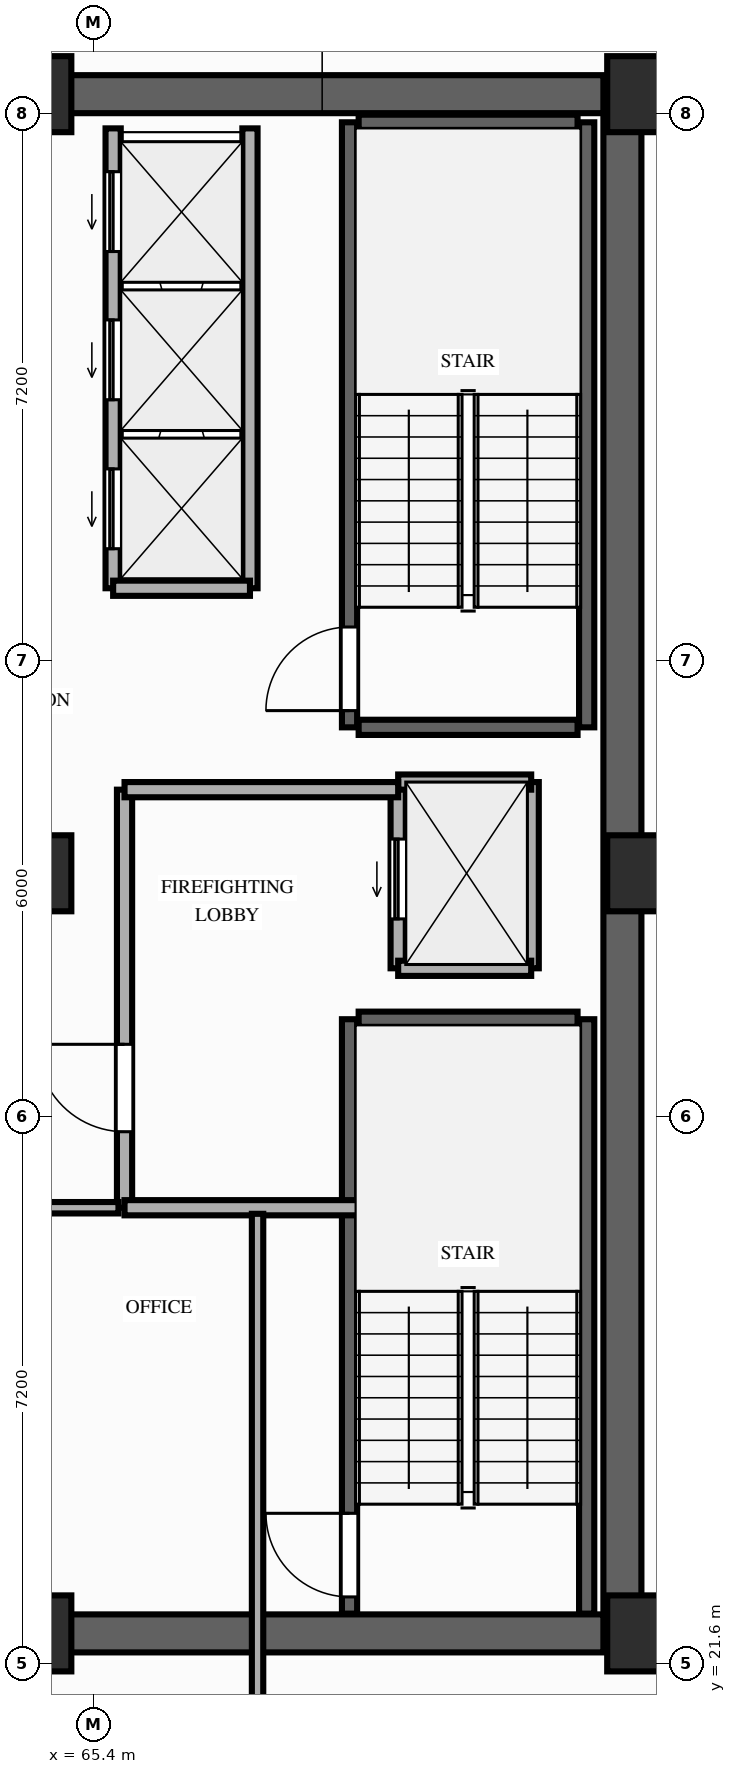
"""IFC4 building model, lengths in metres.
Left out: names, types, materials, properties, quantities, classifications, styles, units other than length and angle.
Written with IfcOpenShell. Run it as: python <this file> out.ifc"""

import sys

from ifc_helpers import new_model, si_unit, direction, frame, frame_2d, origin, origin_2d, place, context, subcontext, project, spatial, rectangle, extrude, element, fill, save


model = new_model("IFC4")
c1 = context("Model", 3, precision=1e-05, world=origin(), true_north=direction((0.0, 1.0)))
c2 = subcontext(c1, "Body", "Model", "MODEL_VIEW")
j1 = project(units=[si_unit("LENGTHUNIT", "METRE"), si_unit("PLANEANGLEUNIT", "RADIAN")], contexts=[c1])
p1 = place(None, origin())
s1 = spatial("IfcSite", under=j1, at=p1, CompositionType="ELEMENT")
p2 = place(p1, origin())
s2 = spatial("IfcBuilding", under=s1, at=p2, CompositionType="ELEMENT")
p3 = place(p2, frame((0.0, 0.0, 26.4)))
s3 = spatial("IfcBuildingStorey", under=s2, at=p3, CompositionType="ELEMENT", Elevation=26.4)
for number, where, z_axis, x_axis in (
    (1, (64.6, 22.0, 0.0), (0.0, 0.0, 1.0), (1.0, 0.0, 0.0)),
    (2, (72.65, 22.0, 0.0), (0.0, 0.0, 1.0), (1.0, 0.0, 0.0)),
    (3, (64.6, 32.0, 0.0), (0.0, 0.0, 1.0), (1.0, 0.0, 0.0)),
    (4, (72.65, 32.0, 0.0), (0.0, 0.0, 1.0), (1.0, 0.0, 0.0)),
    (5, (64.6, 42.25, 0.0), (0.0, 0.0, 1.0), (1.0, 0.0, 0.0)),
    (6, (72.65, 42.25, 0.0), (0.0, 0.0, 1.0), (1.0, 0.0, 0.0)),
):
    element("IfcColumn", number, at=place(p3, frame(where, z_axis=z_axis, x_axis=x_axis)), inside=s3, PredefinedType="COLUMN", context=c2, shape_type="SweptSolid", body=[
        extrude(rectangle(XDim=1.0, YDim=1.0, at=origin_2d()), origin(), (0.0, 0.0, 1.0), 3.8),
    ])
p4 = place(p3, frame((72.35, 22.0, 0.0), z_axis=(0.0, 0.0, 1.0), x_axis=(0.0, 1.0, 0.0)))
e7 = element("IfcWall", 7, at=p4, inside=s3, PredefinedType="SHEAR", context=c2, shape_type="SweptSolid", body=[
    extrude(rectangle(XDim=20.25, YDim=0.5, at=frame_2d((10.125, 0.0))), origin(), (0.0, 0.0, 1.0), 3.62),
])
for number, where, z_axis, x_axis in (
    (8, (64.6, 42.25, 0.0), (0.0, 0.0, 1.0), (1.0, 0.0, 0.0)),
    (9, (64.6, 22.0, 0.0), (0.0, 0.0, 1.0), (1.0, 0.0, 0.0)),
):
    element("IfcWall", number, at=place(p3, frame(where, z_axis=z_axis, x_axis=x_axis)), inside=s3, PredefinedType="SHEAR", context=c2, shape_type="SweptSolid", body=[
        extrude(rectangle(XDim=7.5, YDim=0.5, at=frame_2d((3.75, 0.0))), origin(), (0.0, 0.0, 1.0), 3.62),
    ])
p5 = place(p3, frame((68.76, 22.26, 0.0), z_axis=(0.0, 0.0, 1.0), x_axis=(0.0, 1.0, 0.0)))
e10 = element("IfcWall", 10, at=p5, inside=s3, PredefinedType="SHEAR", context=c2, shape_type="SweptSolid", body=[
    extrude(rectangle(XDim=7.82, YDim=0.2, at=frame_2d((3.91, 0.0))), origin(), (0.0, 0.0, 1.0), 3.62),
])
p6 = place(p5, frame((0.22, 0.0, 0.0)))
e11 = element("IfcOpeningElement", 11, at=p6, cuts=e10, PredefinedType="OPENING", context=c2, shape_type="SweptSolid", body=[
    extrude(rectangle(XDim=1.1, YDim=2.15, at=frame_2d((0.55, 1.075))), frame((0.0, 0.11, 0.0), z_axis=(0.0, -1.0, 0.0), x_axis=(1.0, 0.0, 0.0)), (0.0, 0.0, 1.0), 0.22),
])
p7 = place(p3, frame((71.88, 22.26, 0.0), z_axis=(0.0, 0.0, 1.0), x_axis=(0.0, 1.0, 0.0)))
e12 = element("IfcWall", 12, at=p7, inside=s3, PredefinedType="SHEAR", context=c2, shape_type="SweptSolid", body=[
    extrude(rectangle(XDim=7.82, YDim=0.2, at=frame_2d((3.91, 0.0))), origin(), (0.0, 0.0, 1.0), 3.62),
])
p8 = place(p3, frame((68.88, 30.08, 0.0), z_axis=(0.0, 0.0, 1.0), x_axis=(1.0, 0.0, 0.0)))
e13 = element("IfcWall", 13, at=p8, inside=s3, PredefinedType="SHEAR", context=c2, shape_type="SweptSolid", body=[
    extrude(rectangle(XDim=2.88, YDim=0.2, at=frame_2d((1.44, 0.0))), origin(), (0.0, 0.0, 1.0), 3.62),
])
p9 = place(p3, frame((68.76, 33.92, 0.0), z_axis=(0.0, 0.0, 1.0), x_axis=(0.0, 1.0, 0.0)))
e14 = element("IfcWall", 14, at=p9, inside=s3, PredefinedType="SHEAR", context=c2, shape_type="SweptSolid", body=[
    extrude(rectangle(XDim=7.96, YDim=0.2, at=frame_2d((3.98, 0.0))), origin(), (0.0, 0.0, 1.0), 3.62),
])
p10 = place(p9, frame((0.22, 0.0, 0.0)))
e15 = element("IfcOpeningElement", 15, at=p10, cuts=e14, PredefinedType="OPENING", context=c2, shape_type="SweptSolid", body=[
    extrude(rectangle(XDim=1.1, YDim=2.15, at=frame_2d((0.55, 1.075))), frame((0.0, 0.11, 0.0), z_axis=(0.0, -1.0, 0.0), x_axis=(1.0, 0.0, 0.0)), (0.0, 0.0, 1.0), 0.22),
])
p11 = place(p3, frame((71.88, 33.92, 0.0), z_axis=(0.0, 0.0, 1.0), x_axis=(0.0, 1.0, 0.0)))
e16 = element("IfcWall", 16, at=p11, inside=s3, PredefinedType="SHEAR", context=c2, shape_type="SweptSolid", body=[
    extrude(rectangle(XDim=7.96, YDim=0.2, at=frame_2d((3.98, 0.0))), origin(), (0.0, 0.0, 1.0), 3.62),
])
for number, where, z_axis, x_axis in (
    (17, (68.88, 41.88, 0.0), (0.0, 0.0, 1.0), (1.0, 0.0, 0.0)),
    (18, (68.88, 33.92, 0.0), (0.0, 0.0, 1.0), (1.0, 0.0, 0.0)),
):
    element("IfcWall", number, at=place(p3, frame(where, z_axis=z_axis, x_axis=x_axis)), inside=s3, PredefinedType="SHEAR", context=c2, shape_type="SweptSolid", body=[
        extrude(rectangle(XDim=2.88, YDim=0.2, at=frame_2d((1.44, 0.0))), origin(), (0.0, 0.0, 1.0), 3.62),
    ])
p12 = place(p3, frame((65.65, 35.75, 0.0), z_axis=(0.0, 0.0, 1.0), x_axis=(0.0, 1.0, 0.0)))
e19 = element("IfcWall", 19, at=p12, inside=s3, PredefinedType="MOVABLE", context=c2, shape_type="SweptSolid", body=[
    extrude(rectangle(XDim=6.05, YDim=0.2, at=frame_2d((3.025, 0.0))), origin(), (0.0, 0.0, 1.0), 3.62),
])
p13 = place(p12, frame((0.52, 0.0, 0.0)))
e20 = element("IfcOpeningElement", 20, at=p13, cuts=e19, PredefinedType="OPENING", context=c2, shape_type="SweptSolid", body=[
    extrude(rectangle(XDim=1.05, YDim=2.15, at=frame_2d((0.525, 1.075))), frame((0.0, 0.11, 0.0), z_axis=(0.0, -1.0, 0.0), x_axis=(1.0, 0.0, 0.0)), (0.0, 0.0, 1.0), 0.22),
])
p14 = place(p12, frame((2.48, 0.0, 0.0)))
e21 = element("IfcOpeningElement", 21, at=p14, cuts=e19, PredefinedType="OPENING", context=c2, shape_type="SweptSolid", body=[
    extrude(rectangle(XDim=1.05, YDim=2.15, at=frame_2d((0.525, 1.075))), frame((0.0, 0.11, 0.0), z_axis=(0.0, -1.0, 0.0), x_axis=(1.0, 0.0, 0.0)), (0.0, 0.0, 1.0), 0.22),
])
p15 = place(p12, frame((4.43, 0.0, 0.0)))
e22 = element("IfcOpeningElement", 22, at=p15, cuts=e19, PredefinedType="OPENING", context=c2, shape_type="SweptSolid", body=[
    extrude(rectangle(XDim=1.05, YDim=2.15, at=frame_2d((0.525, 1.075))), frame((0.0, 0.11, 0.0), z_axis=(0.0, -1.0, 0.0), x_axis=(1.0, 0.0, 0.0)), (0.0, 0.0, 1.0), 0.22),
])
p16 = place(p3, frame((67.45, 35.75, 0.0), z_axis=(0.0, 0.0, 1.0), x_axis=(0.0, 1.0, 0.0)))
e23 = element("IfcWall", 23, at=p16, inside=s3, PredefinedType="MOVABLE", context=c2, shape_type="SweptSolid", body=[
    extrude(rectangle(XDim=6.05, YDim=0.2, at=frame_2d((3.025, 0.0))), origin(), (0.0, 0.0, 1.0), 3.62),
])
p17 = place(p3, frame((65.65, 35.75, 0.0), z_axis=(0.0, 0.0, 1.0), x_axis=(1.0, 0.0, 0.0)))
e24 = element("IfcWall", 24, at=p17, inside=s3, PredefinedType="MOVABLE", context=c2, shape_type="SweptSolid", body=[
    extrude(rectangle(XDim=1.8, YDim=0.2, at=frame_2d((0.9, 0.0))), origin(), (0.0, 0.0, 1.0), 3.62),
])
p18 = place(p3, frame((69.4, 30.75, 0.0), z_axis=(0.0, 0.0, 1.0), x_axis=(0.0, 1.0, 0.0)))
e25 = element("IfcWall", 25, at=p18, inside=s3, PredefinedType="MOVABLE", context=c2, shape_type="SweptSolid", body=[
    extrude(rectangle(XDim=2.45, YDim=0.2, at=frame_2d((1.225, 0.0))), origin(), (0.0, 0.0, 1.0), 3.62),
])
p19 = place(p18, frame((0.65, 0.0, 0.0)))
e26 = element("IfcOpeningElement", 26, at=p19, cuts=e25, PredefinedType="OPENING", context=c2, shape_type="SweptSolid", body=[
    extrude(rectangle(XDim=1.05, YDim=2.15, at=frame_2d((0.525, 1.075))), frame((0.0, 0.11, 0.0), z_axis=(0.0, -1.0, 0.0), x_axis=(1.0, 0.0, 0.0)), (0.0, 0.0, 1.0), 0.22),
])
p20 = place(p3, frame((71.15, 30.75, 0.0), z_axis=(0.0, 0.0, 1.0), x_axis=(0.0, 1.0, 0.0)))
e27 = element("IfcWall", 27, at=p20, inside=s3, PredefinedType="MOVABLE", context=c2, shape_type="SweptSolid", body=[
    extrude(rectangle(XDim=2.45, YDim=0.2, at=frame_2d((1.225, 0.0))), origin(), (0.0, 0.0, 1.0), 3.62),
])
for number, where, z_axis, x_axis in (
    (28, (69.4, 33.2, 0.0), (0.0, 0.0, 1.0), (1.0, 0.0, 0.0)),
    (29, (69.4, 30.75, 0.0), (0.0, 0.0, 1.0), (1.0, 0.0, 0.0)),
):
    element("IfcWall", number, at=place(p3, frame(where, z_axis=z_axis, x_axis=x_axis)), inside=s3, PredefinedType="MOVABLE", context=c2, shape_type="SweptSolid", body=[
        extrude(rectangle(XDim=1.75, YDim=0.2, at=frame_2d((0.875, 0.0))), origin(), (0.0, 0.0, 1.0), 3.62),
    ])
p21 = place(p3, frame((65.8, 27.6, 0.0), z_axis=(0.0, 0.0, 1.0), x_axis=(0.0, 1.0, 0.0)))
e30 = element("IfcWall", 30, at=p21, inside=s3, PredefinedType="PARTITIONING", context=c2, shape_type="SweptSolid", body=[
    extrude(rectangle(XDim=5.5, YDim=0.2, at=frame_2d((2.75, 0.0))), origin(), (0.0, 0.0, 1.0), 3.62),
])
p22 = place(p21, frame((1.0, 0.0, 0.0)))
e31 = element("IfcOpeningElement", 31, at=p22, cuts=e30, PredefinedType="OPENING", context=c2, shape_type="SweptSolid", body=[
    extrude(rectangle(XDim=1.15, YDim=2.15, at=frame_2d((0.575, 1.075))), frame((0.0, 0.11, 0.0), z_axis=(0.0, -1.0, 0.0), x_axis=(1.0, 0.0, 0.0)), (0.0, 0.0, 1.0), 0.22),
])
p23 = place(p3, frame((65.8, 33.1, 0.0), z_axis=(0.0, 0.0, 1.0), x_axis=(1.0, 0.0, 0.0)))
e32 = element("IfcWall", 32, at=p23, inside=s3, PredefinedType="PARTITIONING", context=c2, shape_type="SweptSolid", body=[
    extrude(rectangle(XDim=3.6, YDim=0.2, at=frame_2d((1.8, 0.0))), origin(), (0.0, 0.0, 1.0), 3.62),
])
p24 = place(p3, frame((65.8, 27.6, 0.0), z_axis=(0.0, 0.0, 1.0), x_axis=(1.0, 0.0, 0.0)))
e33 = element("IfcWall", 33, at=p24, inside=s3, PredefinedType="PARTITIONING", context=c2, shape_type="SweptSolid", body=[
    extrude(rectangle(XDim=3.4, YDim=0.2, at=frame_2d((1.7, 0.0))), origin(), (0.0, 0.0, 1.0), 3.62),
])
p25 = place(p3, frame((67.55, 21.05, 0.0), z_axis=(0.0, 0.0, 1.0), x_axis=(0.0, 1.0, 0.0)))
e34 = element("IfcWall", 34, at=p25, inside=s3, PredefinedType="PARTITIONING", context=c2, shape_type="SweptSolid", body=[
    extrude(rectangle(XDim=6.47, YDim=0.15, at=frame_2d((3.235, 0.0))), origin(), (0.0, 0.0, 1.0), 3.1),
])
p26 = place(p3, frame((64.25, 27.6, 0.0), z_axis=(0.0, 0.0, 1.0), x_axis=(1.0, 0.0, 0.0)))
e35 = element("IfcWall", 35, at=p26, inside=s3, PredefinedType="PARTITIONING", context=c2, shape_type="SweptSolid", body=[
    extrude(rectangle(XDim=1.47, YDim=0.15, at=frame_2d((0.735, 0.0))), origin(), (0.0, 0.0, 1.0), 3.1),
])
p27 = place(p6, origin())
e36 = element("IfcDoor", 36, at=p27, inside=s3, OperationType="SINGLE_SWING_RIGHT", PredefinedType="DOOR", context=c2, shape_type="SweptSolid", body=[
    extrude(rectangle(XDim=1.1, YDim=2.15, at=frame_2d((0.55, 1.075))), frame((0.0, 0.025, 0.0), z_axis=(0.0, -1.0, 0.0), x_axis=(1.0, 0.0, 0.0)), (0.0, 0.0, 1.0), 0.05),
])
fill(e11, e36)
p28 = place(p10, origin())
e37 = element("IfcDoor", 37, at=p28, inside=s3, OperationType="SINGLE_SWING_LEFT", PredefinedType="DOOR", context=c2, shape_type="SweptSolid", body=[
    extrude(rectangle(XDim=1.1, YDim=2.15, at=frame_2d((0.55, 1.075))), frame((0.0, 0.025, 0.0), z_axis=(0.0, -1.0, 0.0), x_axis=(1.0, 0.0, 0.0)), (0.0, 0.0, 1.0), 0.05),
])
fill(e15, e37)
p29 = place(p13, origin())
e38 = element("IfcDoor", 38, at=p29, inside=s3, OperationType="SLIDING_TO_LEFT", PredefinedType="DOOR", context=c2, shape_type="SweptSolid", body=[
    extrude(rectangle(XDim=1.05, YDim=2.15, at=frame_2d((0.525, 1.075))), frame((0.0, 0.025, 0.0), z_axis=(0.0, -1.0, 0.0), x_axis=(1.0, 0.0, 0.0)), (0.0, 0.0, 1.0), 0.05),
])
fill(e20, e38)
p30 = place(p14, origin())
e39 = element("IfcDoor", 39, at=p30, inside=s3, OperationType="SLIDING_TO_LEFT", PredefinedType="DOOR", context=c2, shape_type="SweptSolid", body=[
    extrude(rectangle(XDim=1.05, YDim=2.15, at=frame_2d((0.525, 1.075))), frame((0.0, 0.025, 0.0), z_axis=(0.0, -1.0, 0.0), x_axis=(1.0, 0.0, 0.0)), (0.0, 0.0, 1.0), 0.05),
])
fill(e21, e39)
p31 = place(p15, origin())
e40 = element("IfcDoor", 40, at=p31, inside=s3, OperationType="SLIDING_TO_LEFT", PredefinedType="DOOR", context=c2, shape_type="SweptSolid", body=[
    extrude(rectangle(XDim=1.05, YDim=2.15, at=frame_2d((0.525, 1.075))), frame((0.0, 0.025, 0.0), z_axis=(0.0, -1.0, 0.0), x_axis=(1.0, 0.0, 0.0)), (0.0, 0.0, 1.0), 0.05),
])
fill(e22, e40)
p32 = place(p19, origin())
e41 = element("IfcDoor", 41, at=p32, inside=s3, OperationType="SLIDING_TO_LEFT", PredefinedType="DOOR", context=c2, shape_type="SweptSolid", body=[
    extrude(rectangle(XDim=1.05, YDim=2.15, at=frame_2d((0.525, 1.075))), frame((0.0, 0.025, 0.0), z_axis=(0.0, -1.0, 0.0), x_axis=(1.0, 0.0, 0.0)), (0.0, 0.0, 1.0), 0.05),
])
fill(e26, e41)
p33 = place(p22, origin())
e42 = element("IfcDoor", 42, at=p33, inside=s3, OperationType="SINGLE_SWING_RIGHT", PredefinedType="DOOR", context=c2, shape_type="SweptSolid", body=[
    extrude(rectangle(XDim=1.15, YDim=2.15, at=frame_2d((0.575, 1.075))), frame((0.0, 0.025, 0.0), z_axis=(0.0, -1.0, 0.0), x_axis=(1.0, 0.0, 0.0)), (0.0, 0.0, 1.0), 0.05),
])
fill(e31, e42)
save(model, sys.argv[1])
